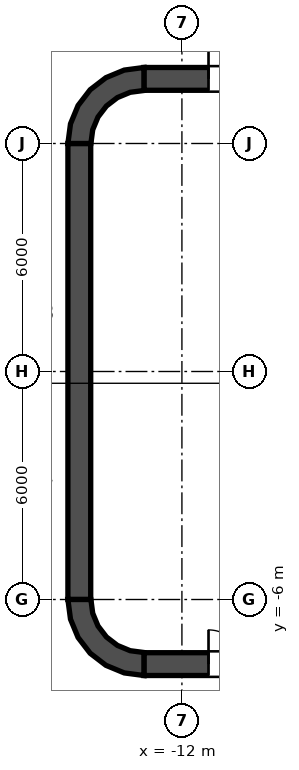
"""IFC4 building model, lengths in metres.
Left out: names, types, materials, properties, quantities, classifications, styles, units other than length and angle.
Written with IfcOpenShell. Run it as: python <this file> out.ifc"""

import sys

from ifc_helpers import new_model, si_unit, direction, frame, frame_2d, origin, place, context, subcontext, project, spatial, polyline, rectangle, outline, extrude, element, fill, save


model = new_model("IFC4")
c1 = context("Model", 3, precision=1e-05, world=origin(), true_north=direction((0.0, 1.0)))
c2 = subcontext(c1, "Body", "Model", "MODEL_VIEW")
j1 = project(units=[si_unit("LENGTHUNIT", "METRE"), si_unit("PLANEANGLEUNIT", "RADIAN")], contexts=[c1])
p1 = place(None, origin())
s1 = spatial("IfcSite", under=j1, at=p1, CompositionType="ELEMENT")
p2 = place(p1, origin())
s2 = spatial("IfcBuilding", under=s1, at=p2, CompositionType="ELEMENT")
p3 = place(p2, frame((0.0, 0.0, 26.0)))
s3 = spatial("IfcBuildingStorey", under=s2, at=p3, CompositionType="ELEMENT", Elevation=26.0)
p4 = place(p3, frame((-13.0, 7.7, 0.0), z_axis=(0.0, 0.0, 1.0), x_axis=(1.0, 0.0, 0.0)))
e1 = element("IfcWall", 1, at=p4, inside=s3, PredefinedType="SHEAR", context=c2, shape_type="SweptSolid", body=[
    extrude(rectangle(XDim=26.0, YDim=0.6, at=frame_2d((13.0, 0.0))), origin(), (0.0, 0.0, 1.0), 5.4),
])
p5 = place(p4, frame((1.7, 0.0, 0.0)))
e2 = element("IfcOpeningElement", 2, at=p5, cuts=e1, PredefinedType="OPENING", context=c2, shape_type="SweptSolid", body=[
    extrude(rectangle(XDim=1.8, YDim=2.1, at=frame_2d((0.9, 1.05))), frame((0.0, 0.3, 0.0), z_axis=(0.0, -1.0, 0.0), x_axis=(1.0, 0.0, 0.0)), (0.0, 0.0, 1.0), 0.6),
])
p6 = place(p4, frame((22.5, 0.0, 0.0)))
e3 = element("IfcOpeningElement", 3, at=p6, cuts=e1, PredefinedType="OPENING", context=c2, shape_type="SweptSolid", body=[
    extrude(rectangle(XDim=1.8, YDim=2.1, at=frame_2d((0.9, 1.05))), frame((0.0, 0.3, 0.0), z_axis=(0.0, -1.0, 0.0), x_axis=(1.0, 0.0, 0.0)), (0.0, 0.0, 1.0), 0.6),
])
p7 = place(p3, frame((-13.0, -7.7, 0.0), z_axis=(0.0, 0.0, 1.0), x_axis=(1.0, 0.0, 0.0)))
e4 = element("IfcWall", 4, at=p7, inside=s3, PredefinedType="SHEAR", context=c2, shape_type="SweptSolid", body=[
    extrude(rectangle(XDim=26.0, YDim=0.6, at=frame_2d((13.0, 0.0))), origin(), (0.0, 0.0, 1.0), 5.4),
])
p8 = place(p7, frame((1.7, 0.0, 0.0)))
e5 = element("IfcOpeningElement", 5, at=p8, cuts=e4, PredefinedType="OPENING", context=c2, shape_type="SweptSolid", body=[
    extrude(rectangle(XDim=1.8, YDim=2.1, at=frame_2d((0.9, 1.05))), frame((0.0, 0.3, 0.0), z_axis=(0.0, -1.0, 0.0), x_axis=(1.0, 0.0, 0.0)), (0.0, 0.0, 1.0), 0.6),
])
p9 = place(p7, frame((22.5, 0.0, 0.0)))
e6 = element("IfcOpeningElement", 6, at=p9, cuts=e4, PredefinedType="OPENING", context=c2, shape_type="SweptSolid", body=[
    extrude(rectangle(XDim=1.8, YDim=2.1, at=frame_2d((0.9, 1.05))), frame((0.0, 0.3, 0.0), z_axis=(0.0, -1.0, 0.0), x_axis=(1.0, 0.0, 0.0)), (0.0, 0.0, 1.0), 0.6),
])
p10 = place(p3, frame((-14.7, -6.0, 0.0), z_axis=(0.0, 0.0, 1.0), x_axis=(0.0, 1.0, 0.0)))
e7 = element("IfcWall", 7, at=p10, inside=s3, PredefinedType="SHEAR", context=c2, shape_type="SweptSolid", body=[
    extrude(rectangle(XDim=12.0, YDim=0.6, at=frame_2d((6.0, 0.0))), origin(), (0.0, 0.0, 1.0), 5.4),
])
p11 = place(p3, origin())
e8 = element("IfcWall", 8, at=p11, inside=s3, PredefinedType="SHEAR", context=c2, shape_type="SweptSolid", body=[
    extrude(outline(polyline([(-15.0, 6.0), (-14.395, 6.0), (-14.347, 6.361), (-14.208, 6.698), (-13.986, 6.986), (-13.698, 7.208), (-13.361, 7.347), (-13.0, 7.395), (-13.0, 8.0), (-13.518, 7.932), (-14.0, 7.732), (-14.414, 7.414), (-14.732, 7.0), (-14.932, 6.518), (-15.0, 6.0)])), origin(), (0.0, 0.0, 1.0), 5.4),
])
e9 = element("IfcWall", 9, at=p11, inside=s3, PredefinedType="SHEAR", context=c2, shape_type="SweptSolid", body=[
    extrude(outline(polyline([(-13.0, -8.0), (-13.0, -7.395), (-13.361, -7.347), (-13.698, -7.208), (-13.986, -6.986), (-14.208, -6.698), (-14.347, -6.361), (-14.395, -6.0), (-15.0, -6.0), (-14.932, -6.518), (-14.732, -7.0), (-14.414, -7.414), (-14.0, -7.732), (-13.518, -7.932), (-13.0, -8.0)])), origin(), (0.0, 0.0, 1.0), 5.4),
])
p12 = place(p3, frame((-11.8, -7.4, 0.0), z_axis=(0.0, 0.0, 1.0), x_axis=(0.0, 1.0, 0.0)))
e10 = element("IfcWall", 10, at=p12, inside=s3, PredefinedType="SOLIDWALL", context=c2, shape_type="SweptSolid", body=[
    extrude(rectangle(XDim=14.8, YDim=0.4, at=frame_2d((7.4, 0.0))), origin(), (0.0, 0.0, 1.0), 5.2),
])
p13 = place(p12, frame((11.2, 0.0, 0.0)))
e11 = element("IfcOpeningElement", 11, at=p13, cuts=e10, PredefinedType="OPENING", context=c2, shape_type="SweptSolid", body=[
    extrude(rectangle(XDim=1.1, YDim=2.1, at=frame_2d((0.55, 1.05))), frame((0.0, 0.2, 0.0), z_axis=(0.0, -1.0, 0.0), x_axis=(1.0, 0.0, 0.0)), (0.0, 0.0, 1.0), 0.4),
])
p14 = place(p12, frame((8.3, 0.0, 0.0)))
e12 = element("IfcOpeningElement", 12, at=p14, cuts=e10, PredefinedType="OPENING", context=c2, shape_type="SweptSolid", body=[
    extrude(rectangle(XDim=1.1, YDim=2.1, at=frame_2d((0.55, 1.05))), frame((0.0, 0.2, 0.0), z_axis=(0.0, -1.0, 0.0), x_axis=(1.0, 0.0, 0.0)), (0.0, 0.0, 1.0), 0.4),
])
p15 = place(p12, frame((5.4, 0.0, 0.0)))
e13 = element("IfcOpeningElement", 13, at=p15, cuts=e10, PredefinedType="OPENING", context=c2, shape_type="SweptSolid", body=[
    extrude(rectangle(XDim=1.1, YDim=2.1, at=frame_2d((0.55, 1.05))), frame((0.0, 0.2, 0.0), z_axis=(0.0, -1.0, 0.0), x_axis=(1.0, 0.0, 0.0)), (0.0, 0.0, 1.0), 0.4),
])
p16 = place(p12, frame((13.552, 0.0, 0.0)))
e14 = element("IfcOpeningElement", 14, at=p16, cuts=e10, PredefinedType="OPENING", context=c2, shape_type="SweptSolid", body=[
    extrude(rectangle(XDim=0.9, YDim=2.1, at=frame_2d((0.45, 1.05))), frame((0.0, 0.2, 0.0), z_axis=(0.0, -1.0, 0.0), x_axis=(1.0, 0.0, 0.0)), (0.0, 0.0, 1.0), 0.4),
])
p17 = place(p12, frame((0.347, 0.0, 0.0)))
e15 = element("IfcOpeningElement", 15, at=p17, cuts=e10, PredefinedType="OPENING", context=c2, shape_type="SweptSolid", body=[
    extrude(rectangle(XDim=0.9, YDim=2.1, at=frame_2d((0.45, 1.05))), frame((0.0, 0.2, 0.0), z_axis=(0.0, -1.0, 0.0), x_axis=(1.0, 0.0, 0.0)), (0.0, 0.0, 1.0), 0.4),
])
e16 = element("IfcWall", 16, at=p11, inside=s3, PredefinedType="SOLIDWALL", context=c2, shape_type="SweptSolid", body=[
    extrude(outline(polyline([(-12.0, -5.925), (-12.0, -5.675), (-14.15, -5.675), (-14.15, -3.025), (-12.0, -3.025), (-12.0, -2.775), (-14.15, -2.775), (-14.15, -0.125), (-12.0, -0.125), (-12.0, 0.125), (-14.15, 0.125), (-14.15, 2.775), (-12.0, 2.775), (-12.0, 3.025), (-14.15, 3.025), (-14.15, 5.675), (-12.0, 5.675), (-12.0, 5.925), (-14.15, 5.925), (-14.4, 5.925), (-14.4, 5.675), (-14.4, 3.025), (-14.4, 2.775), (-14.4, 0.125), (-14.4, -0.125), (-14.4, -2.775), (-14.4, -3.025), (-14.4, -5.675), (-14.4, -5.925), (-14.15, -5.925), (-12.0, -5.925)])), origin(), (0.0, 0.0, 1.0), 5.2),
])
p18 = place(p13, origin())
e17 = element("IfcDoor", 17, at=p18, inside=s3, OperationType="DOUBLE_DOOR_SLIDING", PredefinedType="DOOR", context=c2, shape_type="SweptSolid", body=[
    extrude(rectangle(XDim=1.1, YDim=2.1, at=frame_2d((0.55, 1.05))), frame((0.0, 0.025, 0.0), z_axis=(0.0, -1.0, 0.0), x_axis=(1.0, 0.0, 0.0)), (0.0, 0.0, 1.0), 0.05),
])
fill(e11, e17)
p19 = place(p14, origin())
e18 = element("IfcDoor", 18, at=p19, inside=s3, OperationType="DOUBLE_DOOR_SLIDING", PredefinedType="DOOR", context=c2, shape_type="SweptSolid", body=[
    extrude(rectangle(XDim=1.1, YDim=2.1, at=frame_2d((0.55, 1.05))), frame((0.0, 0.025, 0.0), z_axis=(0.0, -1.0, 0.0), x_axis=(1.0, 0.0, 0.0)), (0.0, 0.0, 1.0), 0.05),
])
fill(e12, e18)
p20 = place(p15, origin())
e19 = element("IfcDoor", 19, at=p20, inside=s3, OperationType="DOUBLE_DOOR_SLIDING", PredefinedType="DOOR", context=c2, shape_type="SweptSolid", body=[
    extrude(rectangle(XDim=1.1, YDim=2.1, at=frame_2d((0.55, 1.05))), frame((0.0, 0.025, 0.0), z_axis=(0.0, -1.0, 0.0), x_axis=(1.0, 0.0, 0.0)), (0.0, 0.0, 1.0), 0.05),
])
fill(e13, e19)
p21 = place(p16, origin())
e20 = element("IfcDoor", 20, at=p21, inside=s3, OperationType="SINGLE_SWING_LEFT", PredefinedType="DOOR", context=c2, shape_type="SweptSolid", body=[
    extrude(rectangle(XDim=0.9, YDim=2.1, at=frame_2d((0.45, 1.05))), frame((0.0, 0.025, 0.0), z_axis=(0.0, -1.0, 0.0), x_axis=(1.0, 0.0, 0.0)), (0.0, 0.0, 1.0), 0.05),
])
fill(e14, e20)
p22 = place(p17, origin())
e21 = element("IfcDoor", 21, at=p22, inside=s3, OperationType="SINGLE_SWING_LEFT", PredefinedType="DOOR", context=c2, shape_type="SweptSolid", body=[
    extrude(rectangle(XDim=0.9, YDim=2.1, at=frame_2d((0.45, 1.05))), frame((0.0, 0.025, 0.0), z_axis=(0.0, -1.0, 0.0), x_axis=(1.0, 0.0, 0.0)), (0.0, 0.0, 1.0), 0.05),
])
fill(e15, e21)
p23 = place(p5, origin())
e22 = element("IfcDoor", 22, at=p23, inside=s3, OperationType="DOUBLE_DOOR_SINGLE_SWING", PredefinedType="DOOR", context=c2, shape_type="SweptSolid", body=[
    extrude(rectangle(XDim=1.8, YDim=2.1, at=frame_2d((0.9, 1.05))), frame((0.0, 0.025, 0.0), z_axis=(0.0, -1.0, 0.0), x_axis=(1.0, 0.0, 0.0)), (0.0, 0.0, 1.0), 0.05),
])
fill(e2, e22)
p24 = place(p8, origin())
e23 = element("IfcDoor", 23, at=p24, inside=s3, OperationType="DOUBLE_DOOR_SINGLE_SWING", PredefinedType="DOOR", context=c2, shape_type="SweptSolid", body=[
    extrude(rectangle(XDim=1.8, YDim=2.1, at=frame_2d((0.9, 1.05))), frame((0.0, 0.025, 0.0), z_axis=(0.0, -1.0, 0.0), x_axis=(1.0, 0.0, 0.0)), (0.0, 0.0, 1.0), 0.05),
])
fill(e5, e23)
save(model, sys.argv[1])
